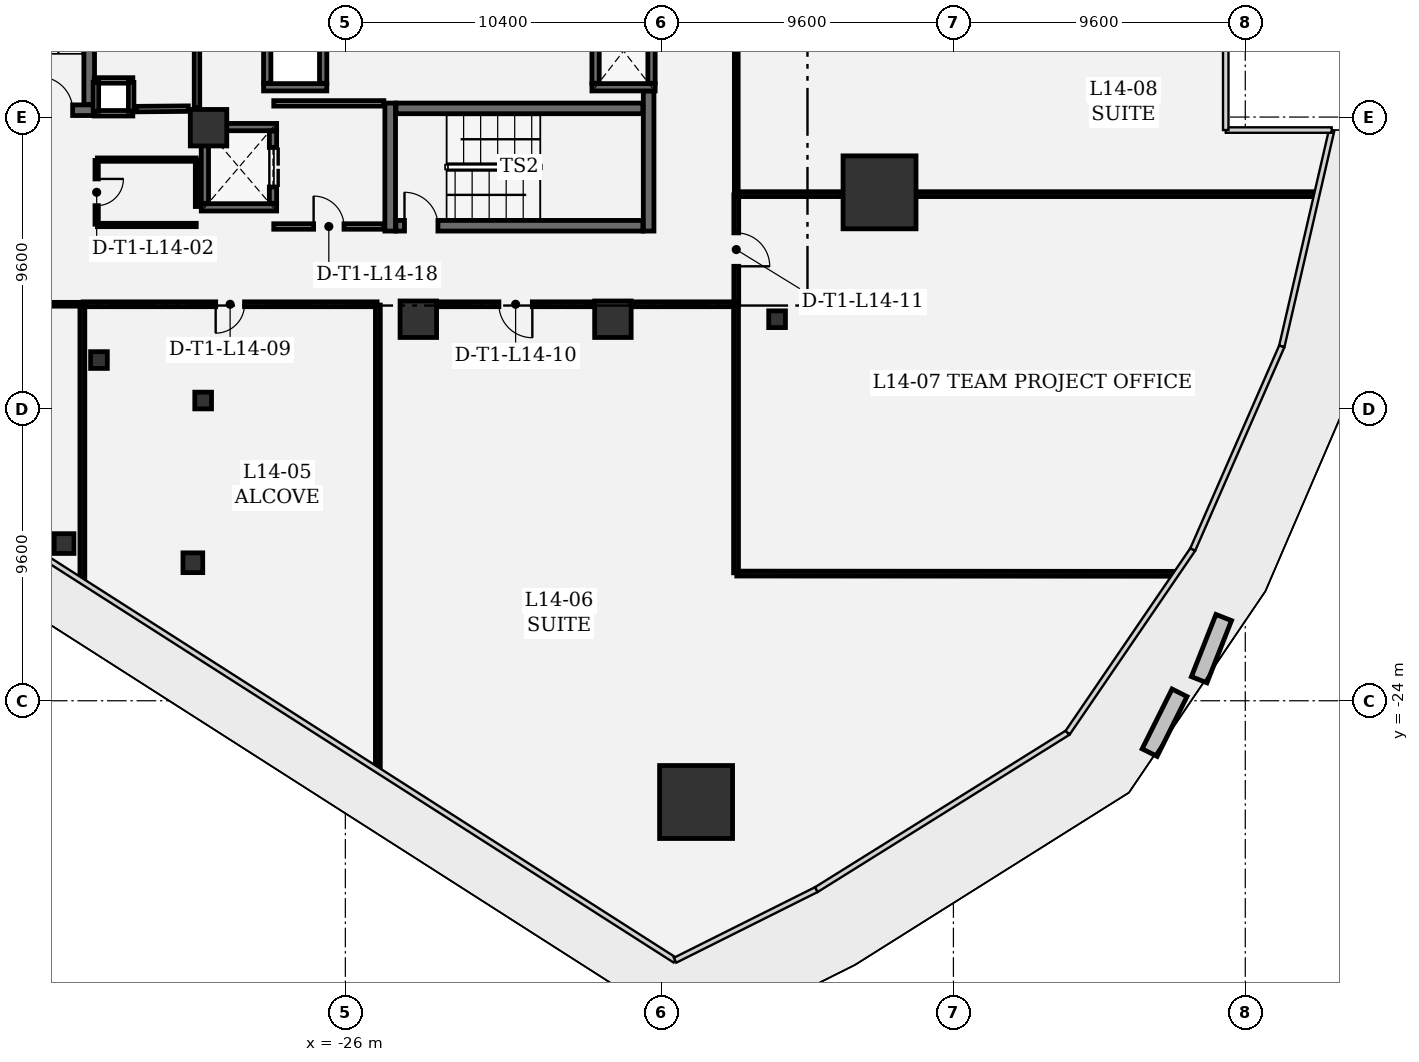
"""IFC4 building model, lengths in metres.
Left out: names, types, materials, properties, quantities, classifications, styles, units other than length and angle.
Written with IfcOpenShell. Run it as: python <this file> out.ifc"""

import sys

from ifc_helpers import new_model, si_unit, direction, frame, frame_2d, origin, origin_2d, place, context, subcontext, project, spatial, rectangle, extrude, element, fill, save


model = new_model("IFC4")
c1 = context("Model", 3, precision=1e-05, world=origin(), true_north=direction((0.0, 1.0)))
c2 = subcontext(c1, "Body", "Model", "MODEL_VIEW")
j1 = project(units=[si_unit("LENGTHUNIT", "METRE"), si_unit("PLANEANGLEUNIT", "RADIAN")], contexts=[c1])
p1 = place(None, origin())
s1 = spatial("IfcSite", under=j1, at=p1, CompositionType="ELEMENT")
p2 = place(p1, origin())
s2 = spatial("IfcBuilding", under=s1, at=p2, CompositionType="ELEMENT")
p3 = place(p2, frame((0.0, 0.0, 66.0)))
s3 = spatial("IfcBuildingStorey", under=s2, at=p3, CompositionType="ELEMENT", Elevation=66.0)
for number, where, z_axis, x_axis in (
    (1, (-14.464, -27.331, 0.0), (0.0, 0.0, 1.0), (1.0, 0.0, 0.0)),
    (2, (-8.43, -7.276, 0.0), (0.0, 0.0, 1.0), (1.0, 0.0, 0.0)),
):
    element("IfcColumn", number, at=place(p3, frame(where, z_axis=z_axis, x_axis=x_axis)), inside=s3, PredefinedType="COLUMN", context=c2, shape_type="SweptSolid", body=[
        extrude(rectangle(XDim=2.4, YDim=2.4, at=origin_2d()), origin(), (0.0, 0.0, 1.0), 4.2),
    ])
for number, where, z_axis, x_axis in (
    (3, (-17.2, -11.45, 0.0), (0.0, 0.0, 1.0), (1.0, 0.0, 0.0)),
    (4, (-23.6, -11.45, 0.0), (0.0, 0.0, 1.0), (1.0, 0.0, 0.0)),
    (5, (-30.5, -5.15, 0.0), (0.0, 0.0, 1.0), (1.0, 0.0, 0.0)),
):
    element("IfcColumn", number, at=place(p3, frame(where, z_axis=z_axis, x_axis=x_axis)), inside=s3, PredefinedType="COLUMN", context=c2, shape_type="SweptSolid", body=[
        extrude(rectangle(XDim=1.2, YDim=1.2, at=origin_2d()), origin(), (0.0, 0.0, 1.0), 4.2),
    ])
for number, where, z_axis, x_axis in (
    (6, (-35.252, -18.829, 0.0), (0.0, 0.0, 1.0), (1.0, 0.0, 0.0)),
    (7, (-31.016, -19.46, 0.0), (0.0, 0.0, 1.0), (1.0, 0.0, 0.0)),
):
    element("IfcColumn", number, at=place(p3, frame(where, z_axis=z_axis, x_axis=x_axis)), inside=s3, PredefinedType="COLUMN", context=c2, shape_type="SweptSolid", body=[
        extrude(rectangle(XDim=0.65, YDim=0.65, at=origin_2d()), origin(), (0.0, 0.0, 1.0), 4.2),
    ])
for number, where, z_axis, x_axis in (
    (8, (-34.104, -12.792, 0.0), (0.0, 0.0, 1.0), (1.0, 0.0, 0.0)),
    (9, (-30.677, -14.124, 0.0), (0.0, 0.0, 1.0), (1.0, 0.0, 0.0)),
    (10, (-11.8, -11.45, 0.0), (0.0, 0.0, 1.0), (1.0, 0.0, 0.0)),
):
    element("IfcColumn", number, at=place(p3, frame(where, z_axis=z_axis, x_axis=x_axis)), inside=s3, PredefinedType="COLUMN", context=c2, shape_type="SweptSolid", body=[
        extrude(rectangle(XDim=0.55, YDim=0.55, at=origin_2d()), origin(), (0.0, 0.0, 1.0), 4.2),
    ])
p4 = place(p3, frame((-24.525, -4.34, 0.0), z_axis=(0.0, 0.0, 1.0), x_axis=(0.0, -1.0, 0.0)))
e11 = element("IfcWall", 11, at=p4, inside=s3, PredefinedType="SHEAR", context=c2, shape_type="SweptSolid", body=[
    extrude(rectangle(XDim=4.21, YDim=0.35, at=frame_2d((2.105, 0.0))), origin(), (0.0, 0.0, 1.0), 3.92),
])
p5 = place(p3, frame((-16.025, -8.55, 0.0), z_axis=(0.0, 0.0, 1.0), x_axis=(0.0, 1.0, 0.0)))
e12 = element("IfcWall", 12, at=p5, inside=s3, PredefinedType="SHEAR", context=c2, shape_type="SweptSolid", body=[
    extrude(rectangle(XDim=4.61, YDim=0.35, at=frame_2d((2.305, 0.0))), origin(), (0.0, 0.0, 1.0), 3.92),
])
p6 = place(p3, frame((-24.335, -8.375, 0.0), z_axis=(0.0, 0.0, 1.0), x_axis=(1.0, 0.0, 0.0)))
e13 = element("IfcWall", 13, at=p6, inside=s3, PredefinedType="SHEAR", context=c2, shape_type="SweptSolid", body=[
    extrude(rectangle(XDim=8.12, YDim=0.35, at=frame_2d((4.06, 0.0))), origin(), (0.0, 0.0, 1.0), 3.92),
])
p7 = place(p6, frame((0.28, 0.0, 0.0)))
e14 = element("IfcOpeningElement", 14, at=p7, cuts=e13, PredefinedType="OPENING", context=c2, shape_type="SweptSolid", body=[
    extrude(rectangle(XDim=1.1, YDim=2.2, at=frame_2d((0.55, 1.1))), frame((0.0, 0.185, 0.0), z_axis=(0.0, -1.0, 0.0), x_axis=(1.0, 0.0, 0.0)), (0.0, 0.0, 1.0), 0.37),
])
p8 = place(p3, frame((-16.215, -4.515, 0.0), z_axis=(0.0, 0.0, 1.0), x_axis=(-1.0, 0.0, 0.0)))
e15 = element("IfcWall", 15, at=p8, inside=s3, PredefinedType="SHEAR", context=c2, shape_type="SweptSolid", body=[
    extrude(rectangle(XDim=8.12, YDim=0.35, at=frame_2d((4.06, 0.0))), origin(), (0.0, 0.0, 1.0), 3.92),
])
p9 = place(p3, frame((-38.46, -4.575, 0.0), z_axis=(0.0, 0.0, 1.0), x_axis=(1.0, 0.0, 0.0)))
e16 = element("IfcWall", 16, at=p9, inside=s3, PredefinedType="SHEAR", context=c2, shape_type="SweptSolid", body=[
    extrude(rectangle(XDim=4.21, YDim=0.35, at=frame_2d((2.105, 0.0))), origin(), (0.0, 0.0, 1.0), 3.92),
])
p10 = place(p9, frame((2.39, 0.0, 0.0)))
e17 = element("IfcOpeningElement", 17, at=p10, cuts=e16, PredefinedType="OPENING", context=c2, shape_type="SweptSolid", body=[
    extrude(rectangle(XDim=1.1, YDim=2.2, at=frame_2d((0.55, 1.1))), frame((0.0, 0.185, 0.0), z_axis=(0.0, -1.0, 0.0), x_axis=(1.0, 0.0, 0.0)), (0.0, 0.0, 1.0), 0.37),
])
p11 = place(p3, frame((-34.425, -4.385, 0.0), z_axis=(0.0, 0.0, 1.0), x_axis=(0.0, 1.0, 0.0)))
e18 = element("IfcWall", 18, at=p11, inside=s3, PredefinedType="SHEAR", context=c2, shape_type="SweptSolid", body=[
    extrude(rectangle(XDim=8.77, YDim=0.35, at=frame_2d((4.385, 0.0))), origin(), (0.0, 0.0, 1.0), 3.92),
])
for number, where, z_axis, x_axis in (
    (19, (-28.26, -7.77, 0.0), (0.0, 0.0, 1.0), (-1.0, 0.0, 0.0)),
    (20, (-30.74, -5.13, 0.0), (0.0, 0.0, 1.0), (1.0, 0.0, 0.0)),
):
    element("IfcWall", number, at=place(p3, frame(where, z_axis=z_axis, x_axis=x_axis)), inside=s3, PredefinedType="SHEAR", context=c2, shape_type="SweptSolid", body=[
        extrude(rectangle(XDim=2.48, YDim=0.24, at=frame_2d((1.24, 0.0))), origin(), (0.0, 0.0, 1.0), 3.92),
    ])
p12 = place(p3, frame((-30.62, -7.638, 0.0), z_axis=(0.0, 0.0, 1.0), x_axis=(0.0, 1.0, 0.0)))
e21 = element("IfcWall", 21, at=p12, inside=s3, PredefinedType="SHEAR", context=c2, shape_type="SweptSolid", body=[
    extrude(rectangle(XDim=2.376, YDim=0.24, at=frame_2d((1.188, 0.0))), origin(), (0.0, 0.0, 1.0), 3.92),
])
p13 = place(p3, frame((-28.38, -5.262, 0.0), z_axis=(0.0, 0.0, 1.0), x_axis=(0.0, -1.0, 0.0)))
e22 = element("IfcWall", 22, at=p13, inside=s3, PredefinedType="SHEAR", context=c2, shape_type="SweptSolid", body=[
    extrude(rectangle(XDim=2.376, YDim=0.24, at=frame_2d((1.188, 0.0))), origin(), (0.0, 0.0, 1.0), 3.92),
])
p14 = place(p13, frame((0.538, 0.0, 0.0)))
e23 = element("IfcOpeningElement", 23, at=p14, cuts=e22, PredefinedType="OPENING", context=c2, shape_type="SweptSolid", body=[
    extrude(rectangle(XDim=1.3, YDim=2.3, at=frame_2d((0.65, 1.15))), frame((0.0, 0.13, 0.0), z_axis=(0.0, -1.0, 0.0), x_axis=(1.0, 0.0, 0.0)), (0.0, 0.0, 1.0), 0.26),
])
p15 = place(p3, frame((-26.61, -3.82, 0.0), z_axis=(0.0, 0.0, 1.0), x_axis=(-1.0, 0.0, 0.0)))
e24 = element("IfcWall", 24, at=p15, inside=s3, PredefinedType="SHEAR", context=c2, shape_type="SweptSolid", body=[
    extrude(rectangle(XDim=2.08, YDim=0.24, at=frame_2d((1.04, 0.0))), origin(), (0.0, 0.0, 1.0), 3.92),
])
for number, where, z_axis, x_axis in (
    (25, (-28.57, -3.688, 0.0), (0.0, 0.0, 1.0), (0.0, 1.0, 0.0)),
    (26, (-26.73, -1.562, 0.0), (0.0, 0.0, 1.0), (0.0, -1.0, 0.0)),
):
    element("IfcWall", number, at=place(p3, frame(where, z_axis=z_axis, x_axis=x_axis)), inside=s3, PredefinedType="SHEAR", context=c2, shape_type="SweptSolid", body=[
        extrude(rectangle(XDim=2.126, YDim=0.24, at=frame_2d((1.063, 0.0))), origin(), (0.0, 0.0, 1.0), 3.92),
    ])
p16 = place(p3, frame((-15.81, -3.82, 0.0), z_axis=(0.0, 0.0, 1.0), x_axis=(-1.0, 0.0, 0.0)))
e27 = element("IfcWall", 27, at=p16, inside=s3, PredefinedType="SHEAR", context=c2, shape_type="SweptSolid", body=[
    extrude(rectangle(XDim=2.08, YDim=0.24, at=frame_2d((1.04, 0.0))), origin(), (0.0, 0.0, 1.0), 3.92),
])
for number, where, z_axis, x_axis in (
    (28, (-17.77, -3.688, 0.0), (0.0, 0.0, 1.0), (0.0, 1.0, 0.0)),
    (29, (-15.93, -1.562, 0.0), (0.0, 0.0, 1.0), (0.0, -1.0, 0.0)),
):
    element("IfcWall", number, at=place(p3, frame(where, z_axis=z_axis, x_axis=x_axis)), inside=s3, PredefinedType="SHEAR", context=c2, shape_type="SweptSolid", body=[
        extrude(rectangle(XDim=2.126, YDim=0.24, at=frame_2d((1.063, 0.0))), origin(), (0.0, 0.0, 1.0), 3.92),
    ])
for number, where, z_axis, x_axis in (
    (30, (-32.99, -4.675, 0.0), (0.0, 0.0, 1.0), (-1.0, 0.0, 0.0)),
    (31, (-34.26, -3.595, 0.0), (0.0, 0.0, 1.0), (1.0, 0.0, 0.0)),
):
    element("IfcWall", number, at=place(p3, frame(where, z_axis=z_axis, x_axis=x_axis)), inside=s3, PredefinedType="PARTITIONING", context=c2, shape_type="SweptSolid", body=[
        extrude(rectangle(XDim=1.27, YDim=0.18, at=frame_2d((0.635, 0.0))), origin(), (0.0, 0.0, 1.0), 3.92),
    ])
for number, where, z_axis, x_axis in (
    (32, (-34.205, -4.61, 0.0), (0.0, 0.0, 1.0), (0.0, 1.0, 0.0)),
    (33, (-33.045, -3.66, 0.0), (0.0, 0.0, 1.0), (0.0, -1.0, 0.0)),
):
    element("IfcWall", number, at=place(p3, frame(where, z_axis=z_axis, x_axis=x_axis)), inside=s3, PredefinedType="PARTITIONING", context=c2, shape_type="SweptSolid", body=[
        extrude(rectangle(XDim=0.95, YDim=0.18, at=frame_2d((0.475, 0.0))), origin(), (0.0, 0.0, 1.0), 3.92),
    ])
p17 = place(p3, frame((-28.355, -8.4, 0.0), z_axis=(0.0, 0.0, 1.0), x_axis=(1.0, 0.0, 0.0)))
e34 = element("IfcWall", 34, at=p17, inside=s3, PredefinedType="PARTITIONING", context=c2, shape_type="SweptSolid", body=[
    extrude(rectangle(XDim=3.622, YDim=0.18, at=frame_2d((1.811, 0.0))), origin(), (0.0, 0.0, 1.0), 3.92),
])
p18 = place(p17, frame((1.311, 0.0, 0.0)))
e35 = element("IfcOpeningElement", 35, at=p18, cuts=e34, PredefinedType="OPENING", context=c2, shape_type="SweptSolid", body=[
    extrude(rectangle(XDim=1.0, YDim=2.15, at=frame_2d((0.5, 1.075))), frame((0.0, 0.1, 0.0), z_axis=(0.0, -1.0, 0.0), x_axis=(1.0, 0.0, 0.0)), (0.0, 0.0, 1.0), 0.2),
])
p19 = place(p3, frame((-24.733, -4.35, 0.0), z_axis=(0.0, 0.0, 1.0), x_axis=(-1.0, 0.0, 0.0)))
e36 = element("IfcWall", 36, at=p19, inside=s3, PredefinedType="PARTITIONING", context=c2, shape_type="SweptSolid", body=[
    extrude(rectangle(XDim=3.622, YDim=0.18, at=frame_2d((1.811, 0.0))), origin(), (0.0, 0.0, 1.0), 3.92),
])
p20 = place(p3, frame((-34.18, -6.225, 0.0), z_axis=(0.0, 0.0, 1.0), x_axis=(0.0, -1.0, 0.0)))
e37 = element("IfcWall", 37, at=p20, inside=s3, PredefinedType="PARTITIONING", context=c2, shape_type="SweptSolid", body=[
    extrude(rectangle(XDim=2.1, YDim=0.11, at=frame_2d((1.05, 0.0))), origin(), (0.0, 0.0, 1.0), 3.92),
])
p21 = place(p20, frame((0.61, 0.0, 0.0)))
e38 = element("IfcOpeningElement", 38, at=p21, cuts=e37, PredefinedType="OPENING", context=c2, shape_type="SweptSolid", body=[
    extrude(rectangle(XDim=0.88, YDim=2.1, at=frame_2d((0.44, 1.05))), frame((0.0, 0.065, 0.0), z_axis=(0.0, -1.0, 0.0), x_axis=(1.0, 0.0, 0.0)), (0.0, 0.0, 1.0), 0.13),
])
p22 = place(p3, frame((-34.155, -8.35, 0.0), z_axis=(0.0, 0.0, 1.0), x_axis=(1.0, 0.0, 0.0)))
e39 = element("IfcWall", 39, at=p22, inside=s3, PredefinedType="PARTITIONING", context=c2, shape_type="SweptSolid", body=[
    extrude(rectangle(XDim=3.25, YDim=0.11, at=frame_2d((1.625, 0.0))), origin(), (0.0, 0.0, 1.0), 3.92),
])
p23 = place(p3, frame((-30.88, -7.743, 0.0), z_axis=(0.0, 0.0, 1.0), x_axis=(0.0, 1.0, 0.0)))
e40 = element("IfcWall", 40, at=p23, inside=s3, PredefinedType="PARTITIONING", context=c2, shape_type="SweptSolid", body=[
    extrude(rectangle(XDim=1.518, YDim=0.11, at=frame_2d((0.759, 0.0))), origin(), (0.0, 0.0, 1.0), 3.92),
])
p24 = place(p3, frame((-30.905, -6.2, 0.0), z_axis=(0.0, 0.0, 1.0), x_axis=(-1.0, 0.0, 0.0)))
e41 = element("IfcWall", 41, at=p24, inside=s3, PredefinedType="PARTITIONING", context=c2, shape_type="SweptSolid", body=[
    extrude(rectangle(XDim=3.25, YDim=0.11, at=frame_2d((1.625, 0.0))), origin(), (0.0, 0.0, 1.0), 3.433),
])
p25 = place(p3, frame((-32.88, -4.538, 0.0), z_axis=(0.0, 0.0, 1.0), x_axis=(0.9999584918, 0.009111239105, 0.0)))
e42 = element("IfcWall", 42, at=p25, inside=s3, PredefinedType="PARTITIONING", context=c2, shape_type="SweptSolid", body=[
    extrude(rectangle(XDim=1.715, YDim=0.18, at=frame_2d((0.857, 0.0))), origin(), (0.0, 0.0, 1.0), 3.92),
])
p26 = place(p3, frame((-30.88, -4.485, 0.0), z_axis=(0.0, 0.0, 1.0), x_axis=(0.0, 1.0, 0.0)))
e43 = element("IfcWall", 43, at=p26, inside=s3, PredefinedType="PARTITIONING", context=c2, shape_type="SweptSolid", body=[
    extrude(rectangle(XDim=2.86, YDim=0.18, at=frame_2d((1.43, 0.0))), origin(), (0.0, 0.0, 1.0), 3.92),
])
p27 = place(p3, frame((-24.956, -10.958, 0.0), z_axis=(0.0, 0.0, 1.0), x_axis=(-1.0, 0.0, 0.0)))
e44 = element("IfcWall", 44, at=p27, inside=s3, PredefinedType="PARTITIONING", context=c2, shape_type="SweptSolid", body=[
    extrude(rectangle(XDim=9.669, YDim=0.16, at=frame_2d((4.834, 0.0))), origin(), (0.0, 0.0, 1.0), 3.433),
])
p28 = place(p27, frame((4.36, 0.0, 0.0)))
e45 = element("IfcOpeningElement", 45, at=p28, cuts=e44, PredefinedType="OPENING", context=c2, shape_type="SweptSolid", body=[
    extrude(rectangle(XDim=0.95, YDim=2.15, at=frame_2d((0.475, 1.075))), frame((0.0, 0.09, 0.0), z_axis=(0.0, -1.0, 0.0), x_axis=(1.0, 0.0, 0.0)), (0.0, 0.0, 1.0), 0.18),
])
p29 = place(p3, frame((-34.65, -10.983, 0.0), z_axis=(0.0, 0.0, 1.0), x_axis=(0.0, -1.0, 0.0)))
e46 = element("IfcWall", 46, at=p29, inside=s3, PredefinedType="PARTITIONING", context=c2, shape_type="SweptSolid", body=[
    extrude(rectangle(XDim=9.012, YDim=0.16, at=frame_2d((4.506, 0.0))), origin(), (0.0, 0.0, 1.0), 3.92),
])
p30 = place(p3, frame((-24.931, -26.207, 0.0), z_axis=(0.0, 0.0, 1.0), x_axis=(0.0, 1.0, 0.0)))
e47 = element("IfcWall", 47, at=p30, inside=s3, PredefinedType="PARTITIONING", context=c2, shape_type="SweptSolid", body=[
    extrude(rectangle(XDim=15.224, YDim=0.16, at=frame_2d((7.612, 0.0))), origin(), (0.0, 0.0, 1.0), 3.433),
])
p31 = place(p3, frame((1.246, -19.824, 0.0), z_axis=(0.0, 0.0, 1.0), x_axis=(-0.999999852235, 0.000543625905, 0.0)))
e48 = element("IfcWall", 48, at=p31, inside=s3, PredefinedType="PARTITIONING", context=c2, shape_type="SweptSolid", body=[
    extrude(rectangle(XDim=14.371, YDim=0.16, at=frame_2d((7.186, 0.0))), origin(), (0.0, 0.0, 1.0), 3.92),
])
p32 = place(p3, frame((-13.15, -19.792, 0.0), z_axis=(0.0, 0.0, 1.0), x_axis=(0.0, 1.0, 0.0)))
e49 = element("IfcWall", 49, at=p32, inside=s3, PredefinedType="PARTITIONING", context=c2, shape_type="SweptSolid", body=[
    extrude(rectangle(XDim=8.809, YDim=0.16, at=frame_2d((4.404, 0.0))), origin(), (0.0, 0.0, 1.0), 3.92),
])
p33 = place(p3, frame((-13.175, -10.958, 0.0), z_axis=(0.0, 0.0, 1.0), x_axis=(-1.0, 0.0, 0.0)))
e50 = element("IfcWall", 50, at=p33, inside=s3, PredefinedType="PARTITIONING", context=c2, shape_type="SweptSolid", body=[
    extrude(rectangle(XDim=3.36, YDim=0.16, at=frame_2d((1.68, 0.0))), origin(), (0.0, 0.0, 1.0), 2.957),
])
p34 = place(p3, frame((-17.865, -10.958, 0.0), z_axis=(0.0, 0.0, 1.0), x_axis=(-1.0, 0.0, 0.0)))
e51 = element("IfcWall", 51, at=p34, inside=s3, PredefinedType="PARTITIONING", context=c2, shape_type="SweptSolid", body=[
    extrude(rectangle(XDim=5.07, YDim=0.16, at=frame_2d((2.535, 0.0))), origin(), (0.0, 0.0, 1.0), 3.92),
])
p35 = place(p34, frame((1.985, 0.0, 0.0)))
e52 = element("IfcOpeningElement", 52, at=p35, cuts=e51, PredefinedType="OPENING", context=c2, shape_type="SweptSolid", body=[
    extrude(rectangle(XDim=1.1, YDim=2.15, at=frame_2d((0.55, 1.075))), frame((0.0, 0.09, 0.0), z_axis=(0.0, -1.0, 0.0), x_axis=(1.0, 0.0, 0.0)), (0.0, 0.0, 1.0), 0.18),
])
p36 = place(p3, frame((5.876, -7.336, 0.0), z_axis=(0.0, 0.0, 1.0), x_axis=(-1.0, 0.0, 0.0)))
e53 = element("IfcWall", 53, at=p36, inside=s3, PredefinedType="PARTITIONING", context=c2, shape_type="SweptSolid", body=[
    extrude(rectangle(XDim=13.041, YDim=0.16, at=frame_2d((6.521, 0.0))), origin(), (0.0, 0.0, 1.0), 3.92),
])
p37 = place(p3, frame((-9.695, -7.336, 0.0), z_axis=(0.0, 0.0, 1.0), x_axis=(-1.0, 0.0, 0.0)))
e54 = element("IfcWall", 54, at=p37, inside=s3, PredefinedType="PARTITIONING", context=c2, shape_type="SweptSolid", body=[
    extrude(rectangle(XDim=3.422, YDim=0.16, at=frame_2d((1.711, 0.0))), origin(), (0.0, 0.0, 1.0), 3.92),
])
p38 = place(p3, frame((-13.142, -7.361, 0.0), z_axis=(0.0, 0.0, 1.0), x_axis=(0.0, -1.0, 0.0)))
e55 = element("IfcWall", 55, at=p38, inside=s3, PredefinedType="PARTITIONING", context=c2, shape_type="SweptSolid", body=[
    extrude(rectangle(XDim=3.597, YDim=0.16, at=frame_2d((1.799, 0.0))), origin(), (0.0, 0.0, 1.0), 3.92),
])
p39 = place(p38, frame((1.249, 0.0, 0.0)))
e56 = element("IfcOpeningElement", 56, at=p39, cuts=e55, PredefinedType="OPENING", context=c2, shape_type="SweptSolid", body=[
    extrude(rectangle(XDim=1.1, YDim=2.15, at=frame_2d((0.55, 1.075))), frame((0.0, 0.09, 0.0), z_axis=(0.0, -1.0, 0.0), x_axis=(1.0, 0.0, 0.0)), (0.0, 0.0, 1.0), 0.18),
])
p40 = place(p3, frame((-13.142, -1.333, 0.0), z_axis=(0.0, 0.0, 1.0), x_axis=(0.0, -1.0, 0.0)))
e57 = element("IfcWall", 57, at=p40, inside=s3, PredefinedType="PARTITIONING", context=c2, shape_type="SweptSolid", body=[
    extrude(rectangle(XDim=5.97, YDim=0.125, at=frame_2d((2.985, 0.0))), origin(), (0.0, 0.0, 1.0), 3.92),
])
p41 = place(p3, frame((-34.683, -10.958, 0.0), z_axis=(0.0, 0.0, 1.0), x_axis=(-1.0, 0.0, 0.0)))
e58 = element("IfcWall", 58, at=p41, inside=s3, PredefinedType="PARTITIONING", context=c2, shape_type="SweptSolid", body=[
    extrude(rectangle(XDim=5.95, YDim=0.125, at=frame_2d((2.975, 0.0))), origin(), (0.0, 0.0, 1.0), 3.433),
])
p42 = place(p41, frame((2.5, 0.0, 0.0)))
e59 = element("IfcOpeningElement", 59, at=p42, cuts=e58, PredefinedType="OPENING", context=c2, shape_type="SweptSolid", body=[
    extrude(rectangle(XDim=0.95, YDim=2.15, at=frame_2d((0.475, 1.075))), frame((0.0, 0.073, 0.0), z_axis=(0.0, -1.0, 0.0), x_axis=(1.0, 0.0, 0.0)), (0.0, 0.0, 1.0), 0.145),
])
p43 = place(p7, origin())
e60 = element("IfcDoor", 60, at=p43, inside=s3, OperationType="SINGLE_SWING_LEFT", PredefinedType="DOOR", context=c2, shape_type="SweptSolid", body=[
    extrude(rectangle(XDim=1.1, YDim=2.2, at=frame_2d((0.55, 1.1))), frame((0.0, 0.025, 0.0), z_axis=(0.0, -1.0, 0.0), x_axis=(1.0, 0.0, 0.0)), (0.0, 0.0, 1.0), 0.05),
])
fill(e14, e60)
p44 = place(p10, origin())
e61 = element("IfcDoor", 61, at=p44, inside=s3, OperationType="SINGLE_SWING_LEFT", PredefinedType="DOOR", context=c2, shape_type="SweptSolid", body=[
    extrude(rectangle(XDim=1.1, YDim=2.2, at=frame_2d((0.55, 1.1))), frame((0.0, 0.025, 0.0), z_axis=(0.0, -1.0, 0.0), x_axis=(1.0, 0.0, 0.0)), (0.0, 0.0, 1.0), 0.05),
])
fill(e17, e61)
p45 = place(p14, origin())
e62 = element("IfcDoor", 62, at=p45, inside=s3, OperationType="DOUBLE_DOOR_SLIDING", PredefinedType="DOOR", context=c2, shape_type="SweptSolid", body=[
    extrude(rectangle(XDim=1.3, YDim=2.3, at=frame_2d((0.65, 1.15))), frame((0.0, 0.025, 0.0), z_axis=(0.0, -1.0, 0.0), x_axis=(1.0, 0.0, 0.0)), (0.0, 0.0, 1.0), 0.05),
])
fill(e23, e62)
p46 = place(p21, origin())
e63 = element("IfcDoor", 63, at=p46, inside=s3, OperationType="SINGLE_SWING_LEFT", PredefinedType="DOOR", context=c2, shape_type="SweptSolid", body=[
    extrude(rectangle(XDim=0.88, YDim=2.1, at=frame_2d((0.44, 1.05))), frame((0.0, 0.025, 0.0), z_axis=(0.0, -1.0, 0.0), x_axis=(1.0, 0.0, 0.0)), (0.0, 0.0, 1.0), 0.05),
])
fill(e38, e63)
p47 = place(p28, origin())
e64 = element("IfcDoor", 64, at=p47, inside=s3, OperationType="SINGLE_SWING_RIGHT", PredefinedType="DOOR", context=c2, shape_type="SweptSolid", body=[
    extrude(rectangle(XDim=0.95, YDim=2.15, at=frame_2d((0.475, 1.075))), frame((0.0, 0.025, 0.0), z_axis=(0.0, -1.0, 0.0), x_axis=(1.0, 0.0, 0.0)), (0.0, 0.0, 1.0), 0.05),
])
fill(e45, e64)
p48 = place(p35, origin())
e65 = element("IfcDoor", 65, at=p48, inside=s3, OperationType="SINGLE_SWING_LEFT", PredefinedType="DOOR", context=c2, shape_type="SweptSolid", body=[
    extrude(rectangle(XDim=1.1, YDim=2.15, at=frame_2d((0.55, 1.075))), frame((0.0, 0.025, 0.0), z_axis=(0.0, -1.0, 0.0), x_axis=(1.0, 0.0, 0.0)), (0.0, 0.0, 1.0), 0.05),
])
fill(e52, e65)
p49 = place(p39, origin())
e66 = element("IfcDoor", 66, at=p49, inside=s3, OperationType="SINGLE_SWING_RIGHT", PredefinedType="DOOR", context=c2, shape_type="SweptSolid", body=[
    extrude(rectangle(XDim=1.1, YDim=2.15, at=frame_2d((0.55, 1.075))), frame((0.0, 0.025, 0.0), z_axis=(0.0, -1.0, 0.0), x_axis=(1.0, 0.0, 0.0)), (0.0, 0.0, 1.0), 0.05),
])
fill(e56, e66)
p50 = place(p18, origin())
e67 = element("IfcDoor", 67, at=p50, inside=s3, OperationType="SINGLE_SWING_LEFT", PredefinedType="DOOR", context=c2, shape_type="SweptSolid", body=[
    extrude(rectangle(XDim=1.0, YDim=2.15, at=frame_2d((0.5, 1.075))), frame((0.0, 0.025, 0.0), z_axis=(0.0, -1.0, 0.0), x_axis=(1.0, 0.0, 0.0)), (0.0, 0.0, 1.0), 0.05),
])
fill(e35, e67)
save(model, sys.argv[1])
